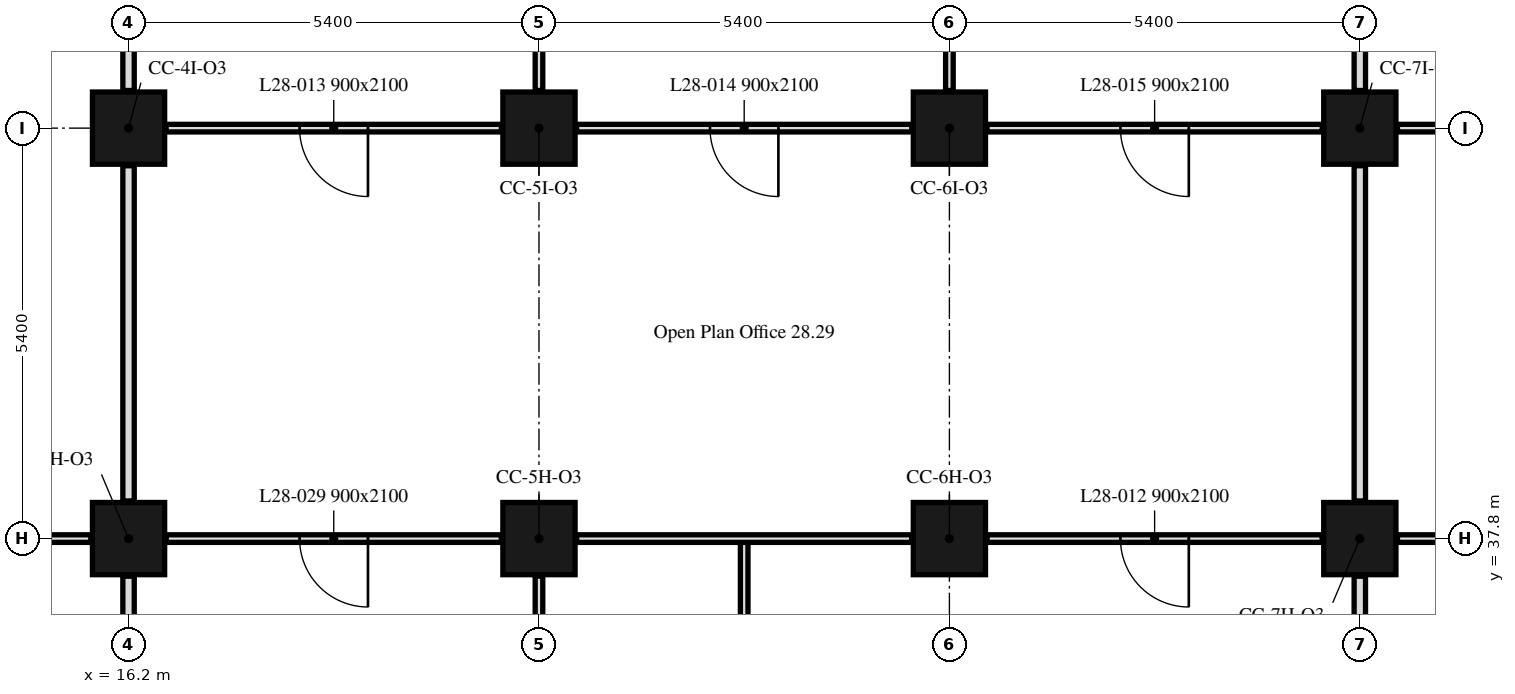
"""IFC4 building model, lengths in metres.
Left out: names, types, materials, properties, quantities, classifications, styles, units other than length and angle.
Written with IfcOpenShell. Run it as: python <this file> out.ifc"""

import sys

from ifc_helpers import new_model, si_unit, direction, frame, frame_2d, origin, origin_2d, place, context, subcontext, project, spatial, rectangle, extrude, element, fill, save


model = new_model("IFC4")
c1 = context("Model", 3, precision=1e-05, world=origin(), true_north=direction((0.0, 1.0)))
c2 = subcontext(c1, "Body", "Model", "MODEL_VIEW")
j1 = project(units=[si_unit("LENGTHUNIT", "METRE"), si_unit("PLANEANGLEUNIT", "RADIAN")], contexts=[c1])
p1 = place(None, origin())
s1 = spatial("IfcSite", under=j1, at=p1, CompositionType="ELEMENT")
p2 = place(p1, origin())
s2 = spatial("IfcBuilding", under=s1, at=p2, CompositionType="ELEMENT")
p3 = place(p2, frame((0.0, 0.0, 118.2)))
s3 = spatial("IfcBuildingStorey", under=s2, at=p3, CompositionType="ELEMENT", Elevation=118.2)
for number, where, z_axis, x_axis in (
    (1, (16.2, 37.8, 0.0), (0.0, 0.0, 1.0), (1.0, 0.0, 0.0)),
    (2, (21.6, 37.8, 0.0), (0.0, 0.0, 1.0), (1.0, 0.0, 0.0)),
    (3, (27.0, 37.8, 0.0), (0.0, 0.0, 1.0), (1.0, 0.0, 0.0)),
    (4, (32.4, 37.8, 0.0), (0.0, 0.0, 1.0), (1.0, 0.0, 0.0)),
    (5, (16.2, 43.2, 0.0), (0.0, 0.0, 1.0), (1.0, 0.0, 0.0)),
    (6, (21.6, 43.2, 0.0), (0.0, 0.0, 1.0), (1.0, 0.0, 0.0)),
    (7, (27.0, 43.2, 0.0), (0.0, 0.0, 1.0), (1.0, 0.0, 0.0)),
    (8, (32.4, 43.2, 0.0), (0.0, 0.0, 1.0), (1.0, 0.0, 0.0)),
):
    element("IfcColumn", number, at=place(p3, frame(where, z_axis=z_axis, x_axis=x_axis)), inside=s3, PredefinedType="COLUMN", context=c2, shape_type="SweptSolid", body=[
        extrude(rectangle(XDim=0.95, YDim=0.95, at=origin_2d()), origin(), (0.0, 0.0, 1.0), 3.5),
    ])
p4 = place(p3, frame((16.2, 35.175, 0.0), z_axis=(0.0, 0.0, 1.0), x_axis=(0.0, 1.0, 0.0)))
e9 = element("IfcWall", 9, at=p4, inside=s3, PredefinedType="PARTITIONING", context=c2, shape_type="SweptSolid", body=[
    extrude(rectangle(XDim=2.13, YDim=0.15, at=frame_2d((1.065, 0.0))), origin(), (0.0, 0.0, 1.0), 2.75),
])
p5 = place(p3, frame((15.705, 37.8, 0.0), z_axis=(0.0, 0.0, 1.0), x_axis=(-1.0, 0.0, 0.0)))
e10 = element("IfcWall", 10, at=p5, inside=s3, PredefinedType="PARTITIONING", context=c2, shape_type="SweptSolid", body=[
    extrude(rectangle(XDim=4.41, YDim=0.1, at=frame_2d((2.205, 0.0))), origin(), (0.0, 0.0, 1.0), 2.75),
])
p6 = place(p3, frame((16.2, 38.295, 0.0), z_axis=(0.0, 0.0, 1.0), x_axis=(0.0, 1.0, 0.0)))
e11 = element("IfcWall", 11, at=p6, inside=s3, PredefinedType="PARTITIONING", context=c2, shape_type="SweptSolid", body=[
    extrude(rectangle(XDim=4.41, YDim=0.15, at=frame_2d((2.205, 0.0))), origin(), (0.0, 0.0, 1.0), 2.75),
])
p7 = place(p3, frame((16.2, 43.695, 0.0), z_axis=(0.0, 0.0, 1.0), x_axis=(0.0, 1.0, 0.0)))
e12 = element("IfcWall", 12, at=p7, inside=s3, PredefinedType="PARTITIONING", context=c2, shape_type="SweptSolid", body=[
    extrude(rectangle(XDim=4.154, YDim=0.15, at=frame_2d((2.077, 0.0))), origin(), (0.0, 0.0, 1.0), 2.75),
])
p8 = place(p3, frame((21.6, 35.175, 0.0), z_axis=(0.0, 0.0, 1.0), x_axis=(0.0, 1.0, 0.0)))
e13 = element("IfcWall", 13, at=p8, inside=s3, PredefinedType="PARTITIONING", context=c2, shape_type="SweptSolid", body=[
    extrude(rectangle(XDim=2.13, YDim=0.1, at=frame_2d((1.065, 0.0))), origin(), (0.0, 0.0, 1.0), 2.75),
])
p9 = place(p3, frame((21.105, 37.8, 0.0), z_axis=(0.0, 0.0, 1.0), x_axis=(-1.0, 0.0, 0.0)))
e14 = element("IfcWall", 14, at=p9, inside=s3, PredefinedType="PARTITIONING", context=c2, shape_type="SweptSolid", body=[
    extrude(rectangle(XDim=4.41, YDim=0.1, at=frame_2d((2.205, 0.0))), origin(), (0.0, 0.0, 1.0), 3.5),
])
p10 = place(p9, frame((1.755, 0.0, 0.0)))
e15 = element("IfcOpeningElement", 15, at=p10, cuts=e14, PredefinedType="OPENING", context=c2, shape_type="SweptSolid", body=[
    extrude(rectangle(XDim=0.9, YDim=2.1, at=frame_2d((0.45, 1.05))), frame((0.0, 0.05, 0.0), z_axis=(0.0, -1.0, 0.0), x_axis=(1.0, 0.0, 0.0)), (0.0, 0.0, 1.0), 0.1),
])
p11 = place(p3, frame((24.3, 35.175, 0.0), z_axis=(0.0, 0.0, 1.0), x_axis=(0.0, 1.0, 0.0)))
e16 = element("IfcWall", 16, at=p11, inside=s3, PredefinedType="PARTITIONING", context=c2, shape_type="SweptSolid", body=[
    extrude(rectangle(XDim=2.575, YDim=0.1, at=frame_2d((1.288, 0.0))), origin(), (0.0, 0.0, 1.0), 3.5),
])
p12 = place(p3, frame((32.4, 35.175, 0.0), z_axis=(0.0, 0.0, 1.0), x_axis=(0.0, 1.0, 0.0)))
e17 = element("IfcWall", 17, at=p12, inside=s3, PredefinedType="PARTITIONING", context=c2, shape_type="SweptSolid", body=[
    extrude(rectangle(XDim=2.13, YDim=0.15, at=frame_2d((1.065, 0.0))), origin(), (0.0, 0.0, 1.0), 2.75),
])
p13 = place(p3, frame((31.905, 37.8, 0.0), z_axis=(0.0, 0.0, 1.0), x_axis=(-1.0, 0.0, 0.0)))
e18 = element("IfcWall", 18, at=p13, inside=s3, PredefinedType="PARTITIONING", context=c2, shape_type="SweptSolid", body=[
    extrude(rectangle(XDim=4.41, YDim=0.1, at=frame_2d((2.205, 0.0))), origin(), (0.0, 0.0, 1.0), 3.5),
])
p14 = place(p13, frame((1.755, 0.0, 0.0)))
e19 = element("IfcOpeningElement", 19, at=p14, cuts=e18, PredefinedType="OPENING", context=c2, shape_type="SweptSolid", body=[
    extrude(rectangle(XDim=0.9, YDim=2.1, at=frame_2d((0.45, 1.05))), frame((0.0, 0.05, 0.0), z_axis=(0.0, -1.0, 0.0), x_axis=(1.0, 0.0, 0.0)), (0.0, 0.0, 1.0), 0.1),
])
p15 = place(p3, frame((26.505, 37.8, 0.0), z_axis=(0.0, 0.0, 1.0), x_axis=(-1.0, 0.0, 0.0)))
e20 = element("IfcWall", 20, at=p15, inside=s3, PredefinedType="PARTITIONING", context=c2, shape_type="SweptSolid", body=[
    extrude(rectangle(XDim=4.41, YDim=0.1, at=frame_2d((2.205, 0.0))), origin(), (0.0, 0.0, 1.0), 3.5),
])
p16 = place(p3, frame((32.4, 38.295, 0.0), z_axis=(0.0, 0.0, 1.0), x_axis=(0.0, 1.0, 0.0)))
e21 = element("IfcWall", 21, at=p16, inside=s3, PredefinedType="PARTITIONING", context=c2, shape_type="SweptSolid", body=[
    extrude(rectangle(XDim=4.41, YDim=0.15, at=frame_2d((2.205, 0.0))), origin(), (0.0, 0.0, 1.0), 2.75),
])
p17 = place(p3, frame((31.905, 43.2, 0.0), z_axis=(0.0, 0.0, 1.0), x_axis=(-1.0, 0.0, 0.0)))
e22 = element("IfcWall", 22, at=p17, inside=s3, PredefinedType="PARTITIONING", context=c2, shape_type="SweptSolid", body=[
    extrude(rectangle(XDim=4.41, YDim=0.1, at=frame_2d((2.205, 0.0))), origin(), (0.0, 0.0, 1.0), 3.5),
])
p18 = place(p17, frame((1.755, 0.0, 0.0)))
e23 = element("IfcOpeningElement", 23, at=p18, cuts=e22, PredefinedType="OPENING", context=c2, shape_type="SweptSolid", body=[
    extrude(rectangle(XDim=0.9, YDim=2.1, at=frame_2d((0.45, 1.05))), frame((0.0, 0.05, 0.0), z_axis=(0.0, -1.0, 0.0), x_axis=(1.0, 0.0, 0.0)), (0.0, 0.0, 1.0), 0.1),
])
p19 = place(p3, frame((26.505, 43.2, 0.0), z_axis=(0.0, 0.0, 1.0), x_axis=(-1.0, 0.0, 0.0)))
e24 = element("IfcWall", 24, at=p19, inside=s3, PredefinedType="PARTITIONING", context=c2, shape_type="SweptSolid", body=[
    extrude(rectangle(XDim=4.41, YDim=0.1, at=frame_2d((2.205, 0.0))), origin(), (0.0, 0.0, 1.0), 3.5),
])
p20 = place(p19, frame((1.755, 0.0, 0.0)))
e25 = element("IfcOpeningElement", 25, at=p20, cuts=e24, PredefinedType="OPENING", context=c2, shape_type="SweptSolid", body=[
    extrude(rectangle(XDim=0.9, YDim=2.1, at=frame_2d((0.45, 1.05))), frame((0.0, 0.05, 0.0), z_axis=(0.0, -1.0, 0.0), x_axis=(1.0, 0.0, 0.0)), (0.0, 0.0, 1.0), 0.1),
])
p21 = place(p3, frame((21.105, 43.2, 0.0), z_axis=(0.0, 0.0, 1.0), x_axis=(-1.0, 0.0, 0.0)))
e26 = element("IfcWall", 26, at=p21, inside=s3, PredefinedType="PARTITIONING", context=c2, shape_type="SweptSolid", body=[
    extrude(rectangle(XDim=4.41, YDim=0.1, at=frame_2d((2.205, 0.0))), origin(), (0.0, 0.0, 1.0), 3.5),
])
p22 = place(p21, frame((1.755, 0.0, 0.0)))
e27 = element("IfcOpeningElement", 27, at=p22, cuts=e26, PredefinedType="OPENING", context=c2, shape_type="SweptSolid", body=[
    extrude(rectangle(XDim=0.9, YDim=2.1, at=frame_2d((0.45, 1.05))), frame((0.0, 0.05, 0.0), z_axis=(0.0, -1.0, 0.0), x_axis=(1.0, 0.0, 0.0)), (0.0, 0.0, 1.0), 0.1),
])
for number, where, z_axis, x_axis in (
    (28, (21.6, 43.695, 0.0), (0.0, 0.0, 1.0), (0.0, 1.0, 0.0)),
    (29, (27.0, 43.695, 0.0), (0.0, 0.0, 1.0), (0.0, 1.0, 0.0)),
):
    element("IfcWall", number, at=place(p3, frame(where, z_axis=z_axis, x_axis=x_axis)), inside=s3, PredefinedType="PARTITIONING", context=c2, shape_type="SweptSolid", body=[
        extrude(rectangle(XDim=4.154, YDim=0.1, at=frame_2d((2.077, 0.0))), origin(), (0.0, 0.0, 1.0), 2.75),
    ])
p23 = place(p3, frame((32.4, 43.695, 0.0), z_axis=(0.0, 0.0, 1.0), x_axis=(0.0, 1.0, 0.0)))
e30 = element("IfcWall", 30, at=p23, inside=s3, PredefinedType="PARTITIONING", context=c2, shape_type="SweptSolid", body=[
    extrude(rectangle(XDim=4.154, YDim=0.15, at=frame_2d((2.077, 0.0))), origin(), (0.0, 0.0, 1.0), 2.75),
])
p24 = place(p3, frame((37.305, 37.8, 0.0), z_axis=(0.0, 0.0, 1.0), x_axis=(-1.0, 0.0, 0.0)))
e31 = element("IfcWall", 31, at=p24, inside=s3, PredefinedType="PARTITIONING", context=c2, shape_type="SweptSolid", body=[
    extrude(rectangle(XDim=4.41, YDim=0.1, at=frame_2d((2.205, 0.0))), origin(), (0.0, 0.0, 1.0), 3.5),
])
p25 = place(p24, frame((1.755, 0.0, 0.0)))
e32 = element("IfcOpeningElement", 32, at=p25, cuts=e31, PredefinedType="OPENING", context=c2, shape_type="SweptSolid", body=[
    extrude(rectangle(XDim=0.9, YDim=2.1, at=frame_2d((0.45, 1.05))), frame((0.0, 0.05, 0.0), z_axis=(0.0, -1.0, 0.0), x_axis=(1.0, 0.0, 0.0)), (0.0, 0.0, 1.0), 0.1),
])
p26 = place(p3, frame((37.305, 43.2, 0.0), z_axis=(0.0, 0.0, 1.0), x_axis=(-1.0, 0.0, 0.0)))
e33 = element("IfcWall", 33, at=p26, inside=s3, PredefinedType="PARTITIONING", context=c2, shape_type="SweptSolid", body=[
    extrude(rectangle(XDim=4.41, YDim=0.1, at=frame_2d((2.205, 0.0))), origin(), (0.0, 0.0, 1.0), 3.5),
])
p27 = place(p26, frame((1.755, 0.0, 0.0)))
e34 = element("IfcOpeningElement", 34, at=p27, cuts=e33, PredefinedType="OPENING", context=c2, shape_type="SweptSolid", body=[
    extrude(rectangle(XDim=0.9, YDim=2.1, at=frame_2d((0.45, 1.05))), frame((0.0, 0.05, 0.0), z_axis=(0.0, -1.0, 0.0), x_axis=(1.0, 0.0, 0.0)), (0.0, 0.0, 1.0), 0.1),
])
p28 = place(p14, origin())
e35 = element("IfcDoor", 35, at=p28, inside=s3, OperationType="SINGLE_SWING_RIGHT", PredefinedType="DOOR", context=c2, shape_type="SweptSolid", body=[
    extrude(rectangle(XDim=0.9, YDim=2.1, at=frame_2d((0.45, 1.05))), frame((0.0, 0.025, 0.0), z_axis=(0.0, -1.0, 0.0), x_axis=(1.0, 0.0, 0.0)), (0.0, 0.0, 1.0), 0.05),
])
fill(e19, e35)
p29 = place(p22, origin())
e36 = element("IfcDoor", 36, at=p29, inside=s3, OperationType="SINGLE_SWING_RIGHT", PredefinedType="DOOR", context=c2, shape_type="SweptSolid", body=[
    extrude(rectangle(XDim=0.9, YDim=2.1, at=frame_2d((0.45, 1.05))), frame((0.0, 0.025, 0.0), z_axis=(0.0, -1.0, 0.0), x_axis=(1.0, 0.0, 0.0)), (0.0, 0.0, 1.0), 0.05),
])
fill(e27, e36)
p30 = place(p20, origin())
e37 = element("IfcDoor", 37, at=p30, inside=s3, OperationType="SINGLE_SWING_RIGHT", PredefinedType="DOOR", context=c2, shape_type="SweptSolid", body=[
    extrude(rectangle(XDim=0.9, YDim=2.1, at=frame_2d((0.45, 1.05))), frame((0.0, 0.025, 0.0), z_axis=(0.0, -1.0, 0.0), x_axis=(1.0, 0.0, 0.0)), (0.0, 0.0, 1.0), 0.05),
])
fill(e25, e37)
p31 = place(p18, origin())
e38 = element("IfcDoor", 38, at=p31, inside=s3, OperationType="SINGLE_SWING_RIGHT", PredefinedType="DOOR", context=c2, shape_type="SweptSolid", body=[
    extrude(rectangle(XDim=0.9, YDim=2.1, at=frame_2d((0.45, 1.05))), frame((0.0, 0.025, 0.0), z_axis=(0.0, -1.0, 0.0), x_axis=(1.0, 0.0, 0.0)), (0.0, 0.0, 1.0), 0.05),
])
fill(e23, e38)
p32 = place(p10, origin())
e39 = element("IfcDoor", 39, at=p32, inside=s3, OperationType="SINGLE_SWING_LEFT", PredefinedType="DOOR", context=c2, shape_type="SweptSolid", body=[
    extrude(rectangle(XDim=0.9, YDim=2.1, at=frame_2d((0.45, 1.05))), frame((0.0, 0.025, 0.0), z_axis=(0.0, -1.0, 0.0), x_axis=(1.0, 0.0, 0.0)), (0.0, 0.0, 1.0), 0.05),
])
fill(e15, e39)
save(model, sys.argv[1])
